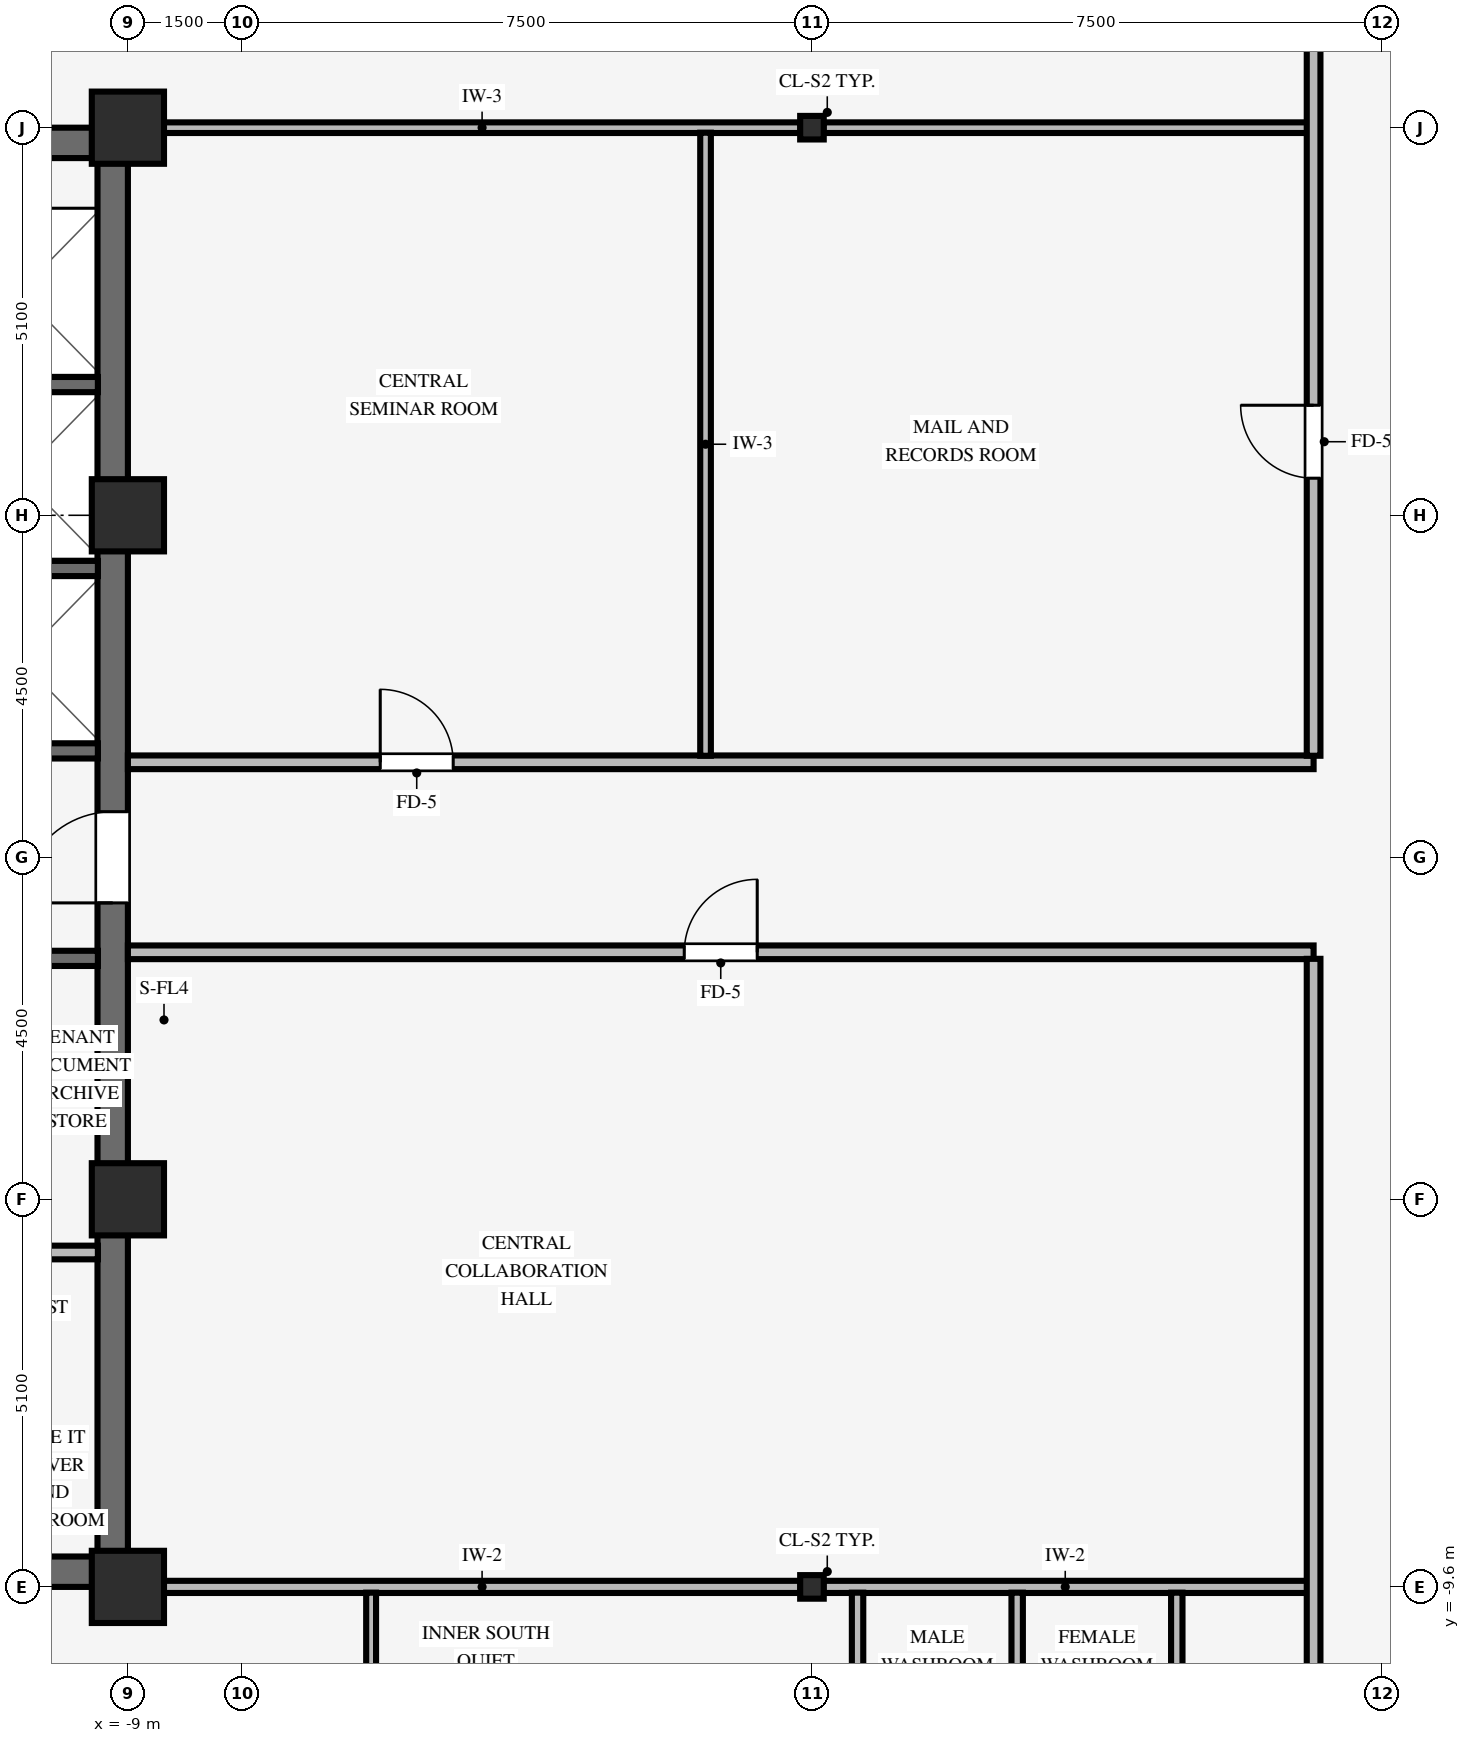
"""IFC4 building model, lengths in metres.
Left out: names, types, materials, properties, quantities, classifications, styles, units other than length and angle.
Written with IfcOpenShell. Run it as: python <this file> out.ifc"""

import sys

from ifc_helpers import new_model, si_unit, direction, frame, frame_2d, origin, origin_2d, place, context, subcontext, project, spatial, rectangle, i_section, extrude, source, transform, mapped, element, fill, save


model = new_model("IFC4")
c1 = context("Model", 3, precision=1e-05, world=origin(), true_north=direction((0.0, 1.0)))
c2 = subcontext(c1, "Body", "Model", "MODEL_VIEW")
j1 = project(units=[si_unit("LENGTHUNIT", "METRE"), si_unit("PLANEANGLEUNIT", "RADIAN")], contexts=[c1])
p1 = place(None, origin())
s1 = spatial("IfcSite", under=j1, at=p1, CompositionType="ELEMENT")
p2 = place(p1, origin())
s2 = spatial("IfcBuilding", under=s1, at=p2, CompositionType="ELEMENT")
p3 = place(p2, frame((0.0, 0.0, 178.6)))
s3 = spatial("IfcBuildingStorey", under=s2, at=p3, CompositionType="ELEMENT", Elevation=178.6)
for number, where, z_axis, x_axis in (
    (1, (-17.5, -9.4, 0.0), (0.0, 0.0, 1.0), (1.0, 0.0, 0.0)),
    (2, (-17.5, 9.4, 0.0), (0.0, 0.0, 1.0), (1.0, 0.0, 0.0)),
):
    element("IfcWall", number, at=place(p3, frame(where, z_axis=z_axis, x_axis=x_axis)), inside=s3, PredefinedType="SHEAR", context=c2, shape_type="SweptSolid", body=[
        extrude(rectangle(XDim=8.5, YDim=0.4, at=frame_2d((4.25, 0.0))), origin(), (0.0, 0.0, 1.0), 3.37),
    ])
p4 = place(p3, frame((-9.2, -9.205, 0.0), z_axis=(0.0, 0.0, 1.0), x_axis=(0.0, 1.0, 0.0)))
e3 = element("IfcWall", 3, at=p4, inside=s3, PredefinedType="SHEAR", context=c2, shape_type="SweptSolid", body=[
    extrude(rectangle(XDim=18.41, YDim=0.4, at=frame_2d((9.205, 0.0))), origin(), (0.0, 0.0, 1.0), 3.37),
])
p5 = place(p4, frame((8.605, 0.0, 0.0)))
e4 = element("IfcOpeningElement", 4, at=p5, cuts=e3, PredefinedType="OPENING", context=c2, shape_type="SweptSolid", body=[
    extrude(rectangle(XDim=1.2, YDim=2.15, at=frame_2d((0.6, 1.075))), frame((0.0, 0.21, 0.0), z_axis=(0.0, -1.0, 0.0), x_axis=(1.0, 0.0, 0.0)), (0.0, 0.0, 1.0), 0.42),
])
for number, where, z_axis, x_axis in (
    (5, (-9.0, -9.6, 0.0), (0.0, 0.0, 1.0), (1.0, 0.0, 0.0)),
    (6, (-9.0, -4.5, 0.0), (0.0, 0.0, 1.0), (1.0, 0.0, 0.0)),
    (7, (-9.0, 4.5, 0.0), (0.0, 0.0, 1.0), (1.0, 0.0, 0.0)),
    (8, (-9.0, 9.6, 0.0), (0.0, 0.0, 1.0), (1.0, 0.0, 0.0)),
):
    element("IfcColumn", number, at=place(p3, frame(where, z_axis=z_axis, x_axis=x_axis)), inside=s3, PredefinedType="COLUMN", context=c2, shape_type="SweptSolid", body=[
        extrude(rectangle(XDim=0.95, YDim=0.95, at=origin_2d()), origin(), (0.0, 0.0, 1.0), 3.37),
    ])
for number, where, z_axis, x_axis in (
    (9, (0.0, -9.6, 0.0), (0.0, 0.0, 1.0), (1.0, 0.0, 0.0)),
    (10, (0.0, 9.6, 0.0), (0.0, 0.0, 1.0), (1.0, 0.0, 0.0)),
):
    element("IfcColumn", number, at=place(p3, frame(where, z_axis=z_axis, x_axis=x_axis)), inside=s3, PredefinedType="COLUMN", context=c2, shape_type="SweptSolid", body=[
        extrude(i_section(OverallWidth=0.31, OverallDepth=0.31, WebThickness=0.015, FlangeThickness=0.015, FilletRadius=0.015, at=origin_2d()), origin(), (0.0, 0.0, 1.0), 3.37),
    ])
p6 = place(p3, frame((-11.505, -1.33, 0.0), z_axis=(0.0, 0.0, 1.0), x_axis=(1.0, 0.0, 0.0)))
e11 = element("IfcWall", 11, at=p6, inside=s3, PredefinedType="SHEAR", context=c2, shape_type="SweptSolid", body=[
    extrude(rectangle(XDim=2.11, YDim=0.2, at=frame_2d((1.055, 0.0))), origin(), (0.0, 0.0, 1.0), 3.37),
])
p7 = place(p3, frame((-11.505, -5.2, 0.0), z_axis=(0.0, 0.0, 1.0), x_axis=(1.0, 0.0, 0.0)))
e12 = element("IfcWall", 12, at=p7, inside=s3, PredefinedType="PARTITIONING", context=c2, shape_type="SweptSolid", body=[
    extrude(rectangle(XDim=2.11, YDim=0.18, at=frame_2d((1.055, 0.0))), origin(), (0.0, 0.0, 1.0), 3.36),
])
for number, where, z_axis, x_axis in (
    (13, (-11.505, 1.4, 0.0), (0.0, 0.0, 1.0), (1.0, 0.0, 0.0)),
    (14, (-11.505, 3.8, 0.0), (0.0, 0.0, 1.0), (1.0, 0.0, 0.0)),
    (15, (-11.505, 6.22, 0.0), (0.0, 0.0, 1.0), (1.0, 0.0, 0.0)),
):
    element("IfcWall", number, at=place(p3, frame(where, z_axis=z_axis, x_axis=x_axis)), inside=s3, PredefinedType="SHEAR", context=c2, shape_type="SweptSolid", body=[
        extrude(rectangle(XDim=2.11, YDim=0.2, at=frame_2d((1.055, 0.0))), origin(), (0.0, 0.0, 1.0), 3.37),
    ])
p8 = place(p3, frame((-8.529, -9.6, 0.0), z_axis=(0.0, 0.0, 1.0), x_axis=(1.0, 0.0, 0.0)))
e16 = element("IfcWall", 16, at=p8, inside=s3, PredefinedType="PARTITIONING", context=c2, shape_type="SweptSolid", body=[
    extrude(rectangle(XDim=8.378, YDim=0.16, at=frame_2d((4.189, 0.0))), origin(), (0.0, 0.0, 1.0), 2.405),
])
p9 = place(p3, frame((0.151, -9.6, 0.0), z_axis=(0.0, 0.0, 1.0), x_axis=(1.0, 0.0, 0.0)))
e17 = element("IfcWall", 17, at=p9, inside=s3, PredefinedType="PARTITIONING", context=c2, shape_type="SweptSolid", body=[
    extrude(rectangle(XDim=6.363, YDim=0.16, at=frame_2d((3.182, 0.0))), origin(), (0.0, 0.0, 1.0), 2.405),
])
p10 = place(p3, frame((-9.0, -1.25, 0.0), z_axis=(0.0, 0.0, 1.0), x_axis=(1.0, 0.0, 0.0)))
e18 = element("IfcWall", 18, at=p10, inside=s3, PredefinedType="PARTITIONING", context=c2, shape_type="SweptSolid", body=[
    extrude(rectangle(XDim=15.6, YDim=0.18, at=frame_2d((7.8, 0.0))), origin(), (0.0, 0.0, 1.0), 3.36),
])
p11 = place(p10, frame((7.32, 0.0, 0.0)))
e19 = element("IfcOpeningElement", 19, at=p11, cuts=e18, PredefinedType="OPENING", context=c2, shape_type="SweptSolid", body=[
    extrude(rectangle(XDim=0.96, YDim=2.1, at=frame_2d((0.48, 1.05))), frame((0.0, 0.1, 0.0), z_axis=(0.0, -1.0, 0.0), x_axis=(1.0, 0.0, 0.0)), (0.0, 0.0, 1.0), 0.2),
])
p12 = place(p3, frame((-9.0, 1.25, 0.0), z_axis=(0.0, 0.0, 1.0), x_axis=(1.0, 0.0, 0.0)))
e20 = element("IfcWall", 20, at=p12, inside=s3, PredefinedType="PARTITIONING", context=c2, shape_type="SweptSolid", body=[
    extrude(rectangle(XDim=15.6, YDim=0.18, at=frame_2d((7.8, 0.0))), origin(), (0.0, 0.0, 1.0), 3.36),
])
p13 = place(p12, frame((3.32, 0.0, 0.0)))
e21 = element("IfcOpeningElement", 21, at=p13, cuts=e20, PredefinedType="OPENING", context=c2, shape_type="SweptSolid", body=[
    extrude(rectangle(XDim=0.96, YDim=2.1, at=frame_2d((0.48, 1.05))), frame((0.0, 0.1, 0.0), z_axis=(0.0, -1.0, 0.0), x_axis=(1.0, 0.0, 0.0)), (0.0, 0.0, 1.0), 0.2),
])
p14 = place(p3, frame((-8.529, 9.6, 0.0), z_axis=(0.0, 0.0, 1.0), x_axis=(1.0, 0.0, 0.0)))
e22 = element("IfcWall", 22, at=p14, inside=s3, PredefinedType="PARTITIONING", context=c2, shape_type="SweptSolid", body=[
    extrude(rectangle(XDim=8.378, YDim=0.14, at=frame_2d((4.189, 0.0))), origin(), (0.0, 0.0, 1.0), 2.405),
])
p15 = place(p3, frame((0.151, 9.6, 0.0), z_axis=(0.0, 0.0, 1.0), x_axis=(1.0, 0.0, 0.0)))
e23 = element("IfcWall", 23, at=p15, inside=s3, PredefinedType="PARTITIONING", context=c2, shape_type="SweptSolid", body=[
    extrude(rectangle(XDim=6.363, YDim=0.14, at=frame_2d((3.182, 0.0))), origin(), (0.0, 0.0, 1.0), 2.405),
])
p16 = place(p3, frame((-5.8, -13.414, 0.0), z_axis=(0.0, 0.0, 1.0), x_axis=(0.0, 1.0, 0.0)))
e24 = element("IfcWall", 24, at=p16, inside=s3, PredefinedType="PARTITIONING", context=c2, shape_type="SweptSolid", body=[
    extrude(rectangle(XDim=3.738, YDim=0.13, at=frame_2d((1.869, 0.0))), origin(), (0.0, 0.0, 1.0), 3.36),
])
p17 = place(p3, frame((-1.4, 1.336, 0.0), z_axis=(0.0, 0.0, 1.0), x_axis=(0.0, 1.0, 0.0)))
e25 = element("IfcWall", 25, at=p17, inside=s3, PredefinedType="PARTITIONING", context=c2, shape_type="SweptSolid", body=[
    extrude(rectangle(XDim=8.198, YDim=0.14, at=frame_2d((4.099, 0.0))), origin(), (0.0, 0.0, 1.0), 3.36),
])
for number, where, z_axis, x_axis in (
    (26, (0.6, -13.414, 0.0), (0.0, 0.0, 1.0), (0.0, 1.0, 0.0)),
    (27, (2.7, -13.414, 0.0), (0.0, 0.0, 1.0), (0.0, 1.0, 0.0)),
    (28, (4.8, -13.414, 0.0), (0.0, 0.0, 1.0), (0.0, 1.0, 0.0)),
):
    element("IfcWall", number, at=place(p3, frame(where, z_axis=z_axis, x_axis=x_axis)), inside=s3, PredefinedType="PARTITIONING", context=c2, shape_type="SweptSolid", body=[
        extrude(rectangle(XDim=3.738, YDim=0.15, at=frame_2d((1.869, 0.0))), origin(), (0.0, 0.0, 1.0), 3.36),
    ])
p18 = place(p3, frame((6.6, -13.414, 0.0), z_axis=(0.0, 0.0, 1.0), x_axis=(0.0, 1.0, 0.0)))
e29 = element("IfcWall", 29, at=p18, inside=s3, PredefinedType="PARTITIONING", context=c2, shape_type="SweptSolid", body=[
    extrude(rectangle(XDim=12.078, YDim=0.18, at=frame_2d((6.039, 0.0))), origin(), (0.0, 0.0, 1.0), 3.36),
])
p19 = place(p18, frame((1.457, 0.0, 0.0)))
e30 = element("IfcOpeningElement", 30, at=p19, cuts=e29, PredefinedType="OPENING", context=c2, shape_type="SweptSolid", body=[
    extrude(rectangle(XDim=0.9, YDim=2.1, at=frame_2d((0.45, 1.05))), frame((0.0, 0.1, 0.0), z_axis=(0.0, -1.0, 0.0), x_axis=(1.0, 0.0, 0.0)), (0.0, 0.0, 1.0), 0.2),
])
p20 = place(p3, frame((6.6, 1.336, 0.0), z_axis=(0.0, 0.0, 1.0), x_axis=(0.0, 1.0, 0.0)))
e31 = element("IfcWall", 31, at=p20, inside=s3, PredefinedType="PARTITIONING", context=c2, shape_type="SweptSolid", body=[
    extrude(rectangle(XDim=12.078, YDim=0.18, at=frame_2d((6.039, 0.0))), origin(), (0.0, 0.0, 1.0), 3.36),
])
p21 = place(p20, frame((3.652, 0.0, 0.0)))
e32 = element("IfcOpeningElement", 32, at=p21, cuts=e31, PredefinedType="OPENING", context=c2, shape_type="SweptSolid", body=[
    extrude(rectangle(XDim=0.96, YDim=2.1, at=frame_2d((0.48, 1.05))), frame((0.0, 0.1, 0.0), z_axis=(0.0, -1.0, 0.0), x_axis=(1.0, 0.0, 0.0)), (0.0, 0.0, 1.0), 0.2),
])
m1 = source(origin(), c2, "Body", "SweptSolid", [
    extrude(rectangle(XDim=1.2, YDim=2.15, at=frame_2d((0.6, 1.075))), frame((0.0, 0.025, 0.0), z_axis=(0.0, -1.0, 0.0), x_axis=(1.0, 0.0, 0.0)), (0.0, 0.0, 1.0), 0.05),
])
p22 = place(p5, origin())
e33 = element("IfcDoor", 33, at=p22, inside=s3, OperationType="SINGLE_SWING_LEFT", PredefinedType="DOOR", context=c2, shape_type="MappedRepresentation", body=[
    mapped(m1, transform((0.0, 0.0, 0.0), scale=1.0)),
])
fill(e4, e33)
m2 = source(origin(), c2, "Body", "SweptSolid", [
    extrude(rectangle(XDim=0.96, YDim=2.1, at=frame_2d((0.48, 1.05))), frame((0.0, 0.025, 0.0), z_axis=(0.0, -1.0, 0.0), x_axis=(1.0, 0.0, 0.0)), (0.0, 0.0, 1.0), 0.05),
])
p23 = place(p11, origin())
e34 = element("IfcDoor", 34, at=p23, inside=s3, OperationType="SINGLE_SWING_RIGHT", PredefinedType="DOOR", context=c2, shape_type="MappedRepresentation", body=[
    mapped(m2, transform((0.0, 0.0, 0.0), scale=1.0)),
])
fill(e19, e34)
p24 = place(p21, origin())
e35 = element("IfcDoor", 35, at=p24, inside=s3, OperationType="SINGLE_SWING_RIGHT", PredefinedType="DOOR", context=c2, shape_type="MappedRepresentation", body=[
    mapped(m2, transform((0.0, 0.0, 0.0), scale=1.0)),
])
fill(e32, e35)
p25 = place(p13, origin())
e36 = element("IfcDoor", 36, at=p25, inside=s3, OperationType="SINGLE_SWING_LEFT", PredefinedType="DOOR", context=c2, shape_type="MappedRepresentation", body=[
    mapped(m2, transform((0.0, 0.0, 0.0), scale=1.0)),
])
fill(e21, e36)
save(model, sys.argv[1])
